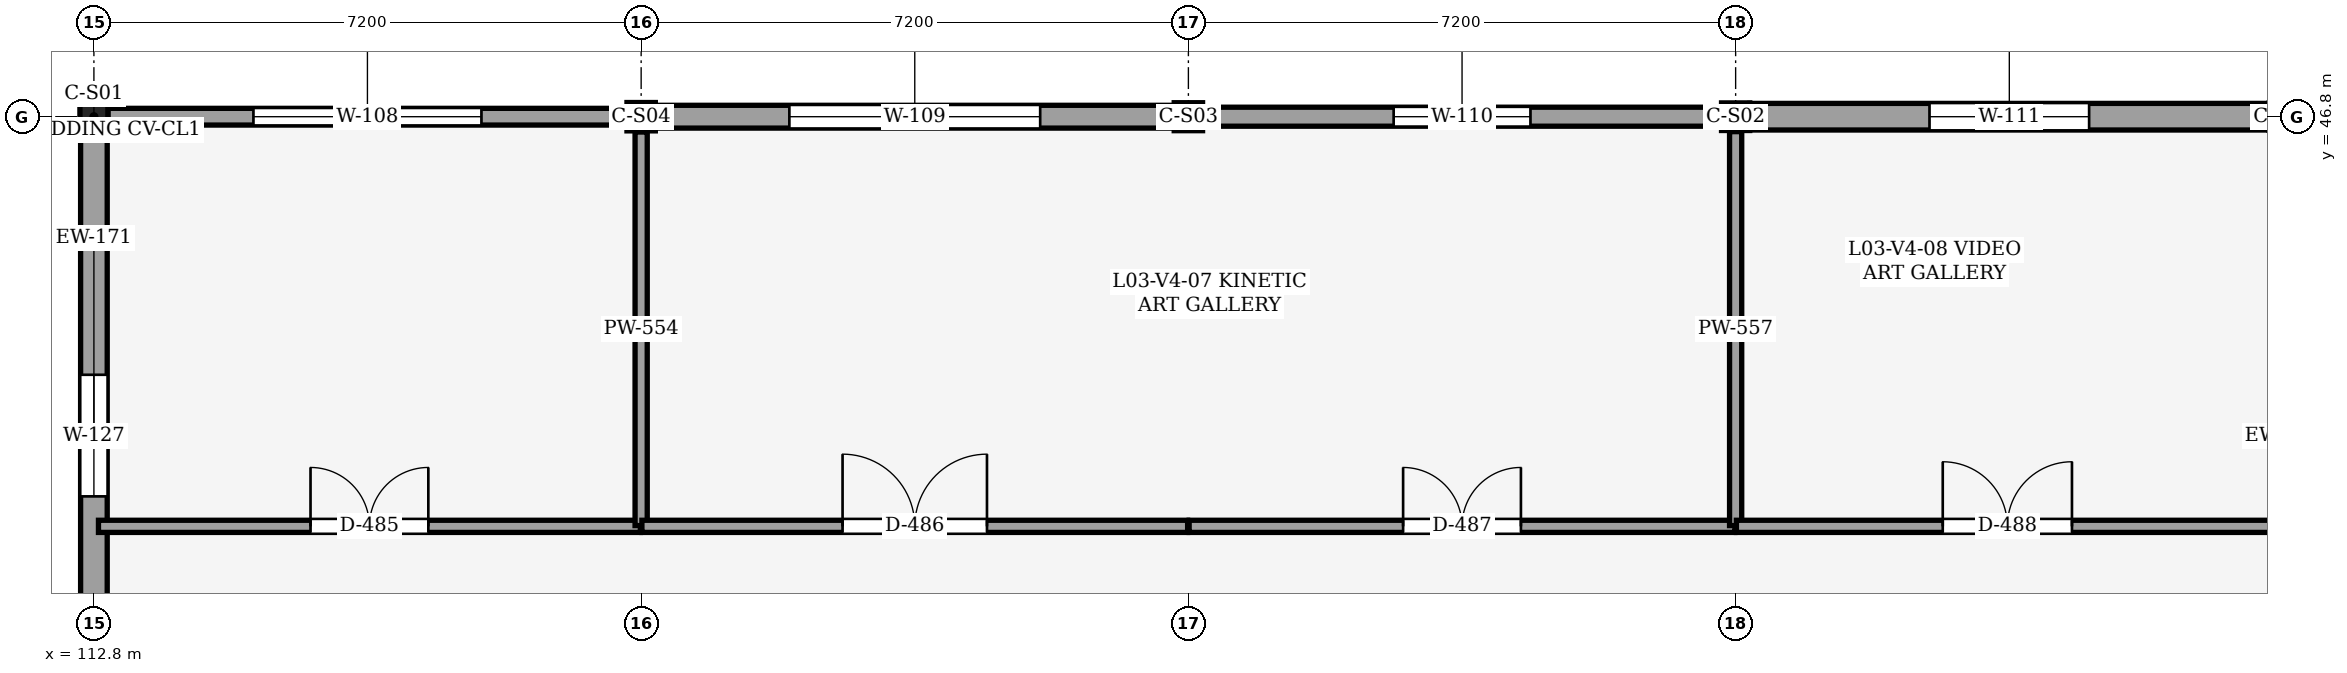
"""IFC4 building model, lengths in metres.
Left out: names, types, materials, properties, quantities, classifications, styles, units other than length and angle.
Written with IfcOpenShell. Run it as: python <this file> out.ifc"""

import sys

from ifc_helpers import new_model, si_unit, direction, frame, frame_2d, origin, origin_2d, place, context, subcontext, project, spatial, rectangle, i_section, extrude, element, fill, save


model = new_model("IFC4")
c1 = context("Model", 3, precision=1e-05, world=origin(), true_north=direction((0.0, 1.0)))
c2 = subcontext(c1, "Body", "Model", "MODEL_VIEW")
j1 = project(units=[si_unit("LENGTHUNIT", "METRE"), si_unit("PLANEANGLEUNIT", "RADIAN")], contexts=[c1])
p1 = place(None, origin())
s1 = spatial("IfcSite", under=j1, at=p1, CompositionType="ELEMENT")
p2 = place(p1, origin())
s2 = spatial("IfcBuilding", under=s1, at=p2, CompositionType="ELEMENT")
p3 = place(p2, frame((0.0, 0.0, 15.0)))
s3 = spatial("IfcBuildingStorey", under=s2, at=p3, CompositionType="ELEMENT", Elevation=15.0)
p4 = place(p3, frame((112.8, 46.8, 0.0), z_axis=(0.0, 0.0, 1.0), x_axis=(1.0, 0.0, 0.0)))
e1 = element("IfcColumn", 1, at=p4, inside=s3, PredefinedType="COLUMN", context=c2, shape_type="SweptSolid", body=[
    extrude(i_section(OverallWidth=0.368, OverallDepth=0.356, WebThickness=0.011, FlangeThickness=0.018, FilletRadius=0.025, at=origin_2d()), origin(), (0.0, 0.0, 1.0), 4.8),
])
p5 = place(p3, frame((120.0, 46.8, 0.0), z_axis=(0.0, 0.0, 1.0), x_axis=(1.0, 0.0, 0.0)))
e2 = element("IfcColumn", 2, at=p5, inside=s3, PredefinedType="COLUMN", context=c2, shape_type="SweptSolid", body=[
    extrude(i_section(OverallWidth=0.373, OverallDepth=0.373, WebThickness=0.016, FlangeThickness=0.026, FilletRadius=0.025, at=origin_2d()), origin(), (0.0, 0.0, 1.0), 4.8),
])
p6 = place(p3, frame((127.2, 46.8, 0.0), z_axis=(0.0, 0.0, 1.0), x_axis=(1.0, 0.0, 0.0)))
e3 = element("IfcColumn", 3, at=p6, inside=s3, PredefinedType="COLUMN", context=c2, shape_type="SweptSolid", body=[
    extrude(i_section(OverallWidth=0.373, OverallDepth=0.368, WebThickness=0.015, FlangeThickness=0.024, FilletRadius=0.025, at=origin_2d()), origin(), (0.0, 0.0, 1.0), 4.8),
])
p7 = place(p3, frame((134.4, 46.8, 0.0), z_axis=(0.0, 0.0, 1.0), x_axis=(1.0, 0.0, 0.0)))
e4 = element("IfcColumn", 4, at=p7, inside=s3, PredefinedType="COLUMN", context=c2, shape_type="SweptSolid", body=[
    extrude(i_section(OverallWidth=0.371, OverallDepth=0.363, WebThickness=0.013, FlangeThickness=0.022, FilletRadius=0.025, at=origin_2d()), origin(), (0.0, 0.0, 1.0), 4.8),
])
p8 = place(p3, frame((112.984, 46.8, 0.0), z_axis=(0.0, 0.0, 1.0), x_axis=(1.0, 0.0, 0.0)))
e5 = element("IfcWall", 5, at=p8, inside=s3, PredefinedType="SOLIDWALL", context=c2, shape_type="SweptSolid", body=[
    extrude(rectangle(XDim=6.83, YDim=0.22, at=frame_2d((3.415, 0.0))), origin(), (0.0, 0.0, 1.0), 3.971),
])
p9 = place(p8, frame((1.915, 0.0, 0.9)))
e6 = element("IfcOpeningElement", 6, at=p9, cuts=e5, PredefinedType="OPENING", context=c2, shape_type="SweptSolid", body=[
    extrude(rectangle(XDim=3.0, YDim=1.75, at=frame_2d((1.5, 0.875))), frame((0.0, 0.12, 0.0), z_axis=(0.0, -1.0, 0.0), x_axis=(1.0, 0.0, 0.0)), (0.0, 0.0, 1.0), 0.24),
])
p10 = place(p3, frame((120.187, 46.8, 0.0), z_axis=(0.0, 0.0, 1.0), x_axis=(1.0, 0.0, 0.0)))
e7 = element("IfcWall", 7, at=p10, inside=s3, PredefinedType="SOLIDWALL", context=c2, shape_type="SweptSolid", body=[
    extrude(rectangle(XDim=6.827, YDim=0.3, at=frame_2d((3.414, 0.0))), origin(), (0.0, 0.0, 1.0), 3.987),
])
p11 = place(p10, frame((1.763, 0.0, 0.9)))
e8 = element("IfcOpeningElement", 8, at=p11, cuts=e7, PredefinedType="OPENING", context=c2, shape_type="SweptSolid", body=[
    extrude(rectangle(XDim=3.3, YDim=1.75, at=frame_2d((1.65, 0.875))), frame((0.0, 0.16, 0.0), z_axis=(0.0, -1.0, 0.0), x_axis=(1.0, 0.0, 0.0)), (0.0, 0.0, 1.0), 0.321),
])
p12 = place(p3, frame((127.386, 46.8, 0.0), z_axis=(0.0, 0.0, 1.0), x_axis=(1.0, 0.0, 0.0)))
e9 = element("IfcWall", 9, at=p12, inside=s3, PredefinedType="SOLIDWALL", context=c2, shape_type="SweptSolid", body=[
    extrude(rectangle(XDim=6.828, YDim=0.25, at=frame_2d((3.414, 0.0))), origin(), (0.0, 0.0, 1.0), 4.215),
])
p13 = place(p12, frame((2.514, 0.0, 0.9)))
e10 = element("IfcOpeningElement", 10, at=p13, cuts=e9, PredefinedType="OPENING", context=c2, shape_type="SweptSolid", body=[
    extrude(rectangle(XDim=1.8, YDim=0.9, at=frame_2d((0.9, 0.45))), frame((0.0, 0.135, 0.0), z_axis=(0.0, -1.0, 0.0), x_axis=(1.0, 0.0, 0.0)), (0.0, 0.0, 1.0), 0.271),
])
p14 = place(p3, frame((134.585, 46.8, 0.0), z_axis=(0.0, 0.0, 1.0), x_axis=(1.0, 0.0, 0.0)))
e11 = element("IfcWall", 11, at=p14, inside=s3, PredefinedType="SOLIDWALL", context=c2, shape_type="SweptSolid", body=[
    extrude(rectangle(XDim=6.831, YDim=0.35, at=frame_2d((3.415, 0.0))), origin(), (0.0, 0.0, 1.0), 3.913),
])
p15 = place(p14, frame((2.365, 0.0, 0.9)))
e12 = element("IfcOpeningElement", 12, at=p15, cuts=e11, PredefinedType="OPENING", context=c2, shape_type="SweptSolid", body=[
    extrude(rectangle(XDim=2.1, YDim=0.9, at=frame_2d((1.05, 0.45))), frame((0.0, 0.185, 0.0), z_axis=(0.0, -1.0, 0.0), x_axis=(1.0, 0.0, 0.0)), (0.0, 0.0, 1.0), 0.371),
])
p16 = place(p3, frame((112.8, 38.586, 0.0), z_axis=(0.0, 0.0, 1.0), x_axis=(0.0, 1.0, 0.0)))
e13 = element("IfcWall", 13, at=p16, inside=s3, PredefinedType="SOLIDWALL", context=c2, shape_type="SweptSolid", body=[
    extrude(rectangle(XDim=8.036, YDim=0.35, at=frame_2d((4.018, 0.0))), origin(), (0.0, 0.0, 1.0), 3.748),
])
p17 = place(p16, frame((3.218, 0.0, 0.9)))
e14 = element("IfcOpeningElement", 14, at=p17, cuts=e13, PredefinedType="OPENING", context=c2, shape_type="SweptSolid", body=[
    extrude(rectangle(XDim=1.6, YDim=1.75, at=frame_2d((0.8, 0.875))), frame((0.0, 0.185, 0.0), z_axis=(0.0, -1.0, 0.0), x_axis=(1.0, 0.0, 0.0)), (0.0, 0.0, 1.0), 0.371),
])
p18 = place(p3, frame((112.86, 41.41, 0.0), z_axis=(0.0, 0.0, 1.0), x_axis=(1.0, 0.0, 0.0)))
e15 = element("IfcWall", 15, at=p18, inside=s3, PredefinedType="PARTITIONING", context=c2, shape_type="SweptSolid", body=[
    extrude(rectangle(XDim=7.13, YDim=0.16, at=frame_2d((3.565, 0.0))), origin(), (0.0, 0.0, 1.0), 4.52),
])
p19 = place(p18, frame((2.79, 0.0, 0.0)))
e16 = element("IfcOpeningElement", 16, at=p19, cuts=e15, PredefinedType="OPENING", context=c2, shape_type="SweptSolid", body=[
    extrude(rectangle(XDim=1.55, YDim=2.3, at=frame_2d((0.775, 1.15))), frame((0.0, 0.09, 0.0), z_axis=(0.0, -1.0, 0.0), x_axis=(1.0, 0.0, 0.0)), (0.0, 0.0, 1.0), 0.18),
])
p20 = place(p3, frame((120.0, 41.42, 0.0), z_axis=(0.0, 0.0, 1.0), x_axis=(0.0, 1.0, 0.0)))
e17 = element("IfcWall", 17, at=p20, inside=s3, PredefinedType="PARTITIONING", context=c2, shape_type="SweptSolid", body=[
    extrude(rectangle(XDim=5.178, YDim=0.16, at=frame_2d((2.589, 0.0))), origin(), (0.0, 0.0, 1.0), 3.664),
])
p21 = place(p3, frame((120.01, 41.41, 0.0), z_axis=(0.0, 0.0, 1.0), x_axis=(1.0, 0.0, 0.0)))
e18 = element("IfcWall", 18, at=p21, inside=s3, PredefinedType="PARTITIONING", context=c2, shape_type="SweptSolid", body=[
    extrude(rectangle(XDim=7.18, YDim=0.16, at=frame_2d((3.59, 0.0))), origin(), (0.0, 0.0, 1.0), 4.52),
])
p22 = place(p21, frame((2.64, 0.0, 0.0)))
e19 = element("IfcOpeningElement", 19, at=p22, cuts=e18, PredefinedType="OPENING", context=c2, shape_type="SweptSolid", body=[
    extrude(rectangle(XDim=1.9, YDim=2.45, at=frame_2d((0.95, 1.225))), frame((0.0, 0.09, 0.0), z_axis=(0.0, -1.0, 0.0), x_axis=(1.0, 0.0, 0.0)), (0.0, 0.0, 1.0), 0.18),
])
p23 = place(p3, frame((127.21, 41.41, 0.0), z_axis=(0.0, 0.0, 1.0), x_axis=(1.0, 0.0, 0.0)))
e20 = element("IfcWall", 20, at=p23, inside=s3, PredefinedType="PARTITIONING", context=c2, shape_type="SweptSolid", body=[
    extrude(rectangle(XDim=7.18, YDim=0.16, at=frame_2d((3.59, 0.0))), origin(), (0.0, 0.0, 1.0), 4.52),
])
p24 = place(p23, frame((2.815, 0.0, 0.0)))
e21 = element("IfcOpeningElement", 21, at=p24, cuts=e20, PredefinedType="OPENING", context=c2, shape_type="SweptSolid", body=[
    extrude(rectangle(XDim=1.55, YDim=2.3, at=frame_2d((0.775, 1.15))), frame((0.0, 0.09, 0.0), z_axis=(0.0, -1.0, 0.0), x_axis=(1.0, 0.0, 0.0)), (0.0, 0.0, 1.0), 0.18),
])
p25 = place(p3, frame((134.4, 41.42, 0.0), z_axis=(0.0, 0.0, 1.0), x_axis=(0.0, 1.0, 0.0)))
e22 = element("IfcWall", 22, at=p25, inside=s3, PredefinedType="PARTITIONING", context=c2, shape_type="SweptSolid", body=[
    extrude(rectangle(XDim=5.184, YDim=0.16, at=frame_2d((2.592, 0.0))), origin(), (0.0, 0.0, 1.0), 3.827),
])
p26 = place(p3, frame((134.41, 41.41, 0.0), z_axis=(0.0, 0.0, 1.0), x_axis=(1.0, 0.0, 0.0)))
e23 = element("IfcWall", 23, at=p26, inside=s3, PredefinedType="PARTITIONING", context=c2, shape_type="SweptSolid", body=[
    extrude(rectangle(XDim=7.13, YDim=0.16, at=frame_2d((3.565, 0.0))), origin(), (0.0, 0.0, 1.0), 4.52),
])
p27 = place(p26, frame((2.715, 0.0, 0.0)))
e24 = element("IfcOpeningElement", 24, at=p27, cuts=e23, PredefinedType="OPENING", context=c2, shape_type="SweptSolid", body=[
    extrude(rectangle(XDim=1.7, YDim=2.4, at=frame_2d((0.85, 1.2))), frame((0.0, 0.09, 0.0), z_axis=(0.0, -1.0, 0.0), x_axis=(1.0, 0.0, 0.0)), (0.0, 0.0, 1.0), 0.18),
])
p28 = place(p9, origin())
e25 = element("IfcWindow", 25, at=p28, inside=s3, PartitioningType="SINGLE_PANEL", PredefinedType="WINDOW", context=c2, shape_type="SweptSolid", body=[
    extrude(rectangle(XDim=3.0, YDim=1.75, at=frame_2d((1.5, 0.875))), frame((0.0, 0.03, 0.0), z_axis=(0.0, -1.0, 0.0), x_axis=(1.0, 0.0, 0.0)), (0.0, 0.0, 1.0), 0.06),
])
fill(e6, e25)
p29 = place(p11, origin())
e26 = element("IfcWindow", 26, at=p29, inside=s3, PartitioningType="SINGLE_PANEL", PredefinedType="WINDOW", context=c2, shape_type="SweptSolid", body=[
    extrude(rectangle(XDim=3.3, YDim=1.75, at=frame_2d((1.65, 0.875))), frame((0.0, 0.03, 0.0), z_axis=(0.0, -1.0, 0.0), x_axis=(1.0, 0.0, 0.0)), (0.0, 0.0, 1.0), 0.06),
])
fill(e8, e26)
p30 = place(p13, origin())
e27 = element("IfcWindow", 27, at=p30, inside=s3, PartitioningType="SINGLE_PANEL", PredefinedType="WINDOW", context=c2, shape_type="SweptSolid", body=[
    extrude(rectangle(XDim=1.8, YDim=0.9, at=frame_2d((0.9, 0.45))), frame((0.0, 0.03, 0.0), z_axis=(0.0, -1.0, 0.0), x_axis=(1.0, 0.0, 0.0)), (0.0, 0.0, 1.0), 0.06),
])
fill(e10, e27)
p31 = place(p15, origin())
e28 = element("IfcWindow", 28, at=p31, inside=s3, PartitioningType="SINGLE_PANEL", PredefinedType="WINDOW", context=c2, shape_type="SweptSolid", body=[
    extrude(rectangle(XDim=2.1, YDim=0.9, at=frame_2d((1.05, 0.45))), frame((0.0, 0.03, 0.0), z_axis=(0.0, -1.0, 0.0), x_axis=(1.0, 0.0, 0.0)), (0.0, 0.0, 1.0), 0.06),
])
fill(e12, e28)
p32 = place(p17, origin())
e29 = element("IfcWindow", 29, at=p32, inside=s3, PartitioningType="SINGLE_PANEL", PredefinedType="WINDOW", context=c2, shape_type="SweptSolid", body=[
    extrude(rectangle(XDim=1.6, YDim=1.75, at=frame_2d((0.8, 0.875))), frame((0.0, 0.03, 0.0), z_axis=(0.0, -1.0, 0.0), x_axis=(1.0, 0.0, 0.0)), (0.0, 0.0, 1.0), 0.06),
])
fill(e14, e29)
p33 = place(p19, origin())
e30 = element("IfcDoor", 30, at=p33, inside=s3, OperationType="DOUBLE_DOOR_SINGLE_SWING", PredefinedType="DOOR", context=c2, shape_type="SweptSolid", body=[
    extrude(rectangle(XDim=1.55, YDim=2.3, at=frame_2d((0.775, 1.15))), frame((0.0, 0.025, 0.0), z_axis=(0.0, -1.0, 0.0), x_axis=(1.0, 0.0, 0.0)), (0.0, 0.0, 1.0), 0.05),
])
fill(e16, e30)
p34 = place(p22, origin())
e31 = element("IfcDoor", 31, at=p34, inside=s3, OperationType="DOUBLE_DOOR_SINGLE_SWING", PredefinedType="DOOR", context=c2, shape_type="SweptSolid", body=[
    extrude(rectangle(XDim=1.9, YDim=2.45, at=frame_2d((0.95, 1.225))), frame((0.0, 0.025, 0.0), z_axis=(0.0, -1.0, 0.0), x_axis=(1.0, 0.0, 0.0)), (0.0, 0.0, 1.0), 0.05),
])
fill(e19, e31)
p35 = place(p24, origin())
e32 = element("IfcDoor", 32, at=p35, inside=s3, OperationType="DOUBLE_DOOR_SINGLE_SWING", PredefinedType="DOOR", context=c2, shape_type="SweptSolid", body=[
    extrude(rectangle(XDim=1.55, YDim=2.3, at=frame_2d((0.775, 1.15))), frame((0.0, 0.025, 0.0), z_axis=(0.0, -1.0, 0.0), x_axis=(1.0, 0.0, 0.0)), (0.0, 0.0, 1.0), 0.05),
])
fill(e21, e32)
p36 = place(p27, origin())
e33 = element("IfcDoor", 33, at=p36, inside=s3, OperationType="DOUBLE_DOOR_SINGLE_SWING", PredefinedType="DOOR", context=c2, shape_type="SweptSolid", body=[
    extrude(rectangle(XDim=1.7, YDim=2.4, at=frame_2d((0.85, 1.2))), frame((0.0, 0.025, 0.0), z_axis=(0.0, -1.0, 0.0), x_axis=(1.0, 0.0, 0.0)), (0.0, 0.0, 1.0), 0.05),
])
fill(e24, e33)
save(model, sys.argv[1])
